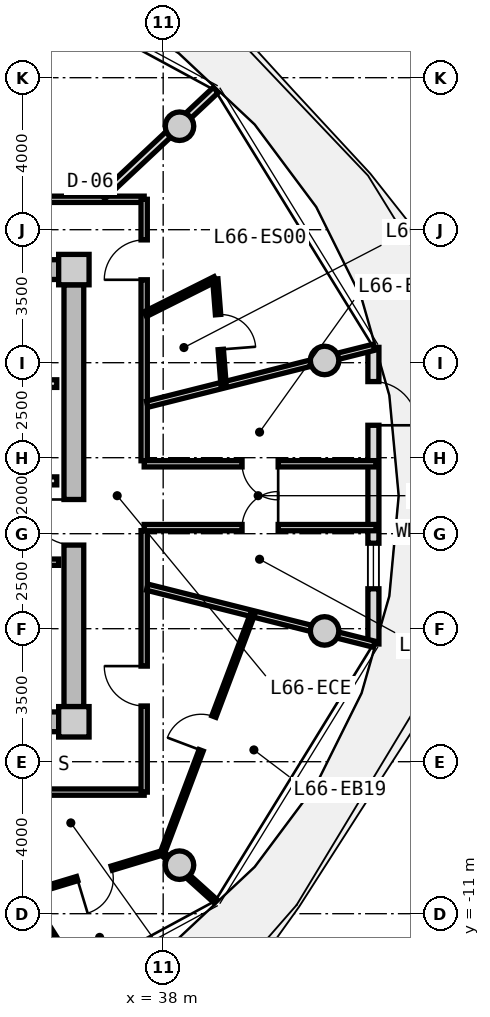
"""IFC4 building model, lengths in metres.
Left out: names, types, materials, properties, quantities, classifications, styles, units other than length and angle.
Written with IfcOpenShell. Run it as: python <this file> out.ifc"""

import sys

from ifc_helpers import new_model, si_unit, direction, frame, frame_2d, origin, origin_2d, place, context, subcontext, project, spatial, rectangle, circle, extrude, source, transform, mapped, element, fill, save


model = new_model("IFC4")
c1 = context("Model", 3, precision=1e-05, world=origin(), true_north=direction((0.0, 1.0)))
c2 = subcontext(c1, "Body", "Model", "MODEL_VIEW")
j1 = project(units=[si_unit("LENGTHUNIT", "METRE"), si_unit("PLANEANGLEUNIT", "RADIAN")], contexts=[c1])
p1 = place(None, origin())
s1 = spatial("IfcSite", under=j1, at=p1, CompositionType="ELEMENT")
p2 = place(p1, origin())
s2 = spatial("IfcBuilding", under=s1, at=p2, CompositionType="ELEMENT")
p3 = place(p2, frame((0.0, 0.0, 213.9)))
s3 = spatial("IfcBuildingStorey", under=s2, at=p3, CompositionType="ELEMENT", Elevation=213.9)
m1 = source(origin(), c2, "Body", "SweptSolid", [
    extrude(rectangle(XDim=0.8, YDim=0.8, at=origin_2d()), origin(), (0.0, 0.0, 1.0), 3.05),
])
for number, where, z_axis, x_axis in (
    (1, (35.65, -5.95, 0.0), (0.0, 0.0, 1.0), (1.0, 0.0, 0.0)),
    (2, (35.65, 5.95, 0.0), (0.0, 0.0, 1.0), (1.0, 0.0, 0.0)),
):
    element("IfcColumn", number, at=place(p3, frame(where, z_axis=z_axis, x_axis=x_axis)), inside=s3, PredefinedType="COLUMN", context=c2, shape_type="MappedRepresentation", body=[
        mapped(m1, transform((0.0, 0.0, 0.0), x_axis=(1.0, 0.0, 0.0), y_axis=(0.0, 1.0, 0.0), z_axis=(0.0, 0.0, 1.0), scale=1.0)),
    ])
m2 = source(origin(), c2, "Body", "SweptSolid", [
    extrude(rectangle(XDim=14.5, YDim=0.52, at=frame_2d((7.25, 0.0))), origin(), (0.0, 0.0, 1.0), 2.76),
])
for number, where, z_axis, x_axis in (
    (3, (20.75, 5.95, 0.0), (0.0, 0.0, 1.0), (1.0, 0.0, 0.0)),
    (4, (35.25, -5.95, 0.0), (0.0, 0.0, 1.0), (-1.0, 0.0, 0.0)),
):
    element("IfcWall", number, at=place(p3, frame(where, z_axis=z_axis, x_axis=x_axis)), inside=s3, PredefinedType="SHEAR", context=c2, shape_type="MappedRepresentation", body=[
        mapped(m2, transform((0.0, 0.0, 0.0), x_axis=(1.0, 0.0, 0.0), y_axis=(0.0, 1.0, 0.0), z_axis=(0.0, 0.0, 1.0), scale=1.0)),
    ])
m3 = source(origin(), c2, "Body", "SweptSolid", [
    extrude(rectangle(XDim=11.1, YDim=0.52, at=frame_2d((5.55, 0.0))), origin(), (0.0, 0.0, 1.0), 2.76),
])
p4 = place(p3, frame((35.65, 5.55, 0.0), z_axis=(0.0, 0.0, 1.0), x_axis=(0.0, -1.0, 0.0)))
e5 = element("IfcWall", 5, at=p4, inside=s3, PredefinedType="SHEAR", context=c2, shape_type="MappedRepresentation", body=[
    mapped(m3, transform((0.0, 0.0, 0.0), x_axis=(1.0, 0.0, 0.0), y_axis=(0.0, 1.0, 0.0), z_axis=(0.0, 0.0, 1.0), scale=1.0)),
])
p5 = place(p4, frame((5.65, 0.0, 0.0)))
e6 = element("IfcOpeningElement", 6, at=p5, cuts=e5, PredefinedType="OPENING", context=c2, shape_type="SweptSolid", body=[
    extrude(rectangle(XDim=1.2, YDim=2.15, at=frame_2d((0.6, 1.075))), frame((0.0, 0.27, 0.0), z_axis=(0.0, -1.0, 0.0), x_axis=(1.0, 0.0, 0.0)), (0.0, 0.0, 1.0), 0.54),
])
m4 = source(origin(), c2, "Body", "SweptSolid", [
    extrude(circle(Radius=0.375, at=origin_2d()), origin(), (0.0, 0.0, 1.0), 3.05),
])
for number, where, z_axis, x_axis in (
    (7, (42.247, 3.559, 0.0), (0.0, 0.0, 1.0), (1.0, 0.0, 0.0)),
    (8, (38.43, 9.723, 0.0), (0.0, 0.0, 1.0), (1.0, 0.0, 0.0)),
    (9, (38.43, -9.723, 0.0), (0.0, 0.0, 1.0), (1.0, 0.0, 0.0)),
    (10, (42.247, -3.559, 0.0), (0.0, 0.0, 1.0), (1.0, 0.0, 0.0)),
):
    element("IfcColumn", number, at=place(p3, frame(where, z_axis=z_axis, x_axis=x_axis)), inside=s3, PredefinedType="COLUMN", context=c2, shape_type="MappedRepresentation", body=[
        mapped(m4, transform((0.0, 0.0, 0.0), x_axis=(1.0, 0.0, 0.0), y_axis=(0.0, 1.0, 0.0), z_axis=(0.0, 0.0, 1.0), scale=1.0)),
    ])
m5 = source(origin(), c2, "Body", "SweptSolid", [
    extrude(rectangle(XDim=7.806, YDim=0.29, at=frame_2d((3.903, 0.0))), origin(), (0.0, 0.0, 1.0), 2.76),
])
p6 = place(p3, frame((43.532, 3.903, 0.0), z_axis=(0.0, 0.0, 1.0), x_axis=(0.0, -1.0, 0.0)))
e11 = element("IfcWall", 11, at=p6, inside=s3, PredefinedType="SOLIDWALL", context=c2, shape_type="MappedRepresentation", body=[
    mapped(m5, transform((0.0, 0.0, 0.0), x_axis=(1.0, 0.0, 0.0), y_axis=(0.0, 1.0, 0.0), z_axis=(0.0, 0.0, 1.0), scale=1.0)),
])
p7 = place(p6, frame((0.9, 0.0, 0.0)))
e12 = element("IfcOpeningElement", 12, at=p7, cuts=e11, PredefinedType="OPENING", context=c2, shape_type="SweptSolid", body=[
    extrude(rectangle(XDim=1.15, YDim=2.25, at=frame_2d((0.575, 1.125))), frame((0.0, 0.155, 0.0), z_axis=(0.0, -1.0, 0.0), x_axis=(1.0, 0.0, 0.0)), (0.0, 0.0, 1.0), 0.31),
])
p8 = place(p6, frame((5.153, 0.0, 0.85)))
e13 = element("IfcOpeningElement", 13, at=p8, cuts=e11, PredefinedType="OPENING", context=c2, shape_type="SweptSolid", body=[
    extrude(rectangle(XDim=1.2, YDim=1.5, at=frame_2d((0.6, 0.75))), frame((0.0, 0.155, 0.0), z_axis=(0.0, -1.0, 0.0), x_axis=(1.0, 0.0, 0.0)), (0.0, 0.0, 1.0), 0.31),
])
m6 = source(origin(), c2, "Body", "SweptSolid", [
    extrude(rectangle(XDim=3.2, YDim=0.2, at=frame_2d((1.6, 0.0))), origin(), (0.0, 0.0, 1.0), 2.745),
])
p9 = place(p3, frame((32.0, 2.95, 0.0), z_axis=(0.0, 0.0, 1.0), x_axis=(1.0, 0.0, 0.0)))
e14 = element("IfcWall", 14, at=p9, inside=s3, PredefinedType="PARTITIONING", context=c2, shape_type="MappedRepresentation", body=[
    mapped(m6, transform((0.0, 0.0, 0.0), x_axis=(1.0, 0.0, 0.0), y_axis=(0.0, 1.0, 0.0), z_axis=(0.0, 0.0, 1.0), scale=1.0)),
])
m7 = source(origin(), c2, "Body", "SweptSolid", [
    extrude(rectangle(XDim=6.66, YDim=0.21, at=frame_2d((3.33, 0.0))), origin(), (0.0, 0.0, 1.0), 2.745),
])
p10 = place(p3, frame((28.54, 0.39, 0.0), z_axis=(0.0, 0.0, 1.0), x_axis=(1.0, 0.0, 0.0)))
e15 = element("IfcWall", 15, at=p10, inside=s3, PredefinedType="PARTITIONING", context=c2, shape_type="MappedRepresentation", body=[
    mapped(m7, transform((0.0, 0.0, 0.0), x_axis=(1.0, 0.0, 0.0), y_axis=(0.0, 1.0, 0.0), z_axis=(0.0, 0.0, 1.0), scale=1.0)),
])
p11 = place(p10, frame((1.0, 0.0, 0.0)))
e16 = element("IfcOpeningElement", 16, at=p11, cuts=e15, PredefinedType="OPENING", context=c2, shape_type="SweptSolid", body=[
    extrude(rectangle(XDim=1.2, YDim=2.15, at=frame_2d((0.6, 1.075))), frame((0.0, 0.115, 0.0), z_axis=(0.0, -1.0, 0.0), x_axis=(1.0, 0.0, 0.0)), (0.0, 0.0, 1.0), 0.23),
])
m8 = source(origin(), c2, "Body", "SweptSolid", [
    extrude(rectangle(XDim=2.7, YDim=0.165, at=frame_2d((1.35, 0.0))), origin(), (0.0, 0.0, 1.0), 2.745),
])
p12 = place(p3, frame((32.55, -1.75, 0.0), z_axis=(0.0, 0.0, 1.0), x_axis=(1.0, 0.0, 0.0)))
e17 = element("IfcWall", 17, at=p12, inside=s3, PredefinedType="PARTITIONING", context=c2, shape_type="MappedRepresentation", body=[
    mapped(m8, transform((0.0, 0.0, 0.0), x_axis=(1.0, 0.0, 0.0), y_axis=(0.0, 1.0, 0.0), z_axis=(0.0, 0.0, 1.0), scale=1.0)),
])
p13 = place(p12, frame((0.85, 0.0, 0.0)))
e18 = element("IfcOpeningElement", 18, at=p13, cuts=e17, PredefinedType="OPENING", context=c2, shape_type="SweptSolid", body=[
    extrude(rectangle(XDim=0.925, YDim=2.1, at=frame_2d((0.462, 1.05))), frame((0.0, 0.093, 0.0), z_axis=(0.0, -1.0, 0.0), x_axis=(1.0, 0.0, 0.0)), (0.0, 0.0, 1.0), 0.185),
])
m9 = source(origin(), c2, "Body", "SweptSolid", [
    extrude(rectangle(XDim=8.58, YDim=0.165, at=frame_2d((4.29, 0.0))), origin(), (0.0, 0.0, 1.0), 2.745),
])
p14 = place(p3, frame((28.92, 7.8, 0.0), z_axis=(0.0, 0.0, 1.0), x_axis=(1.0, 0.0, 0.0)))
e19 = element("IfcWall", 19, at=p14, inside=s3, PredefinedType="PARTITIONING", context=c2, shape_type="MappedRepresentation", body=[
    mapped(m9, transform((0.0, 0.0, 0.0), x_axis=(1.0, 0.0, 0.0), y_axis=(0.0, 1.0, 0.0), z_axis=(0.0, 0.0, 1.0), scale=1.0)),
])
p15 = place(p14, frame((3.802, 0.0, 0.0)))
e20 = element("IfcOpeningElement", 20, at=p15, cuts=e19, PredefinedType="OPENING", context=c2, shape_type="SweptSolid", body=[
    extrude(rectangle(XDim=1.25, YDim=2.2, at=frame_2d((0.625, 1.1))), frame((0.0, 0.093, 0.0), z_axis=(0.0, -1.0, 0.0), x_axis=(1.0, 0.0, 0.0)), (0.0, 0.0, 1.0), 0.185),
])
m10 = source(origin(), c2, "Body", "SweptSolid", [
    extrude(rectangle(XDim=19.0, YDim=0.165, at=frame_2d((9.5, 0.0))), origin(), (0.0, 0.0, 1.0), 2.745),
])
p16 = place(p3, frame((37.5, -7.8, 0.0), z_axis=(0.0, 0.0, 1.0), x_axis=(-1.0, 0.0, 0.0)))
e21 = element("IfcWall", 21, at=p16, inside=s3, PredefinedType="PARTITIONING", context=c2, shape_type="MappedRepresentation", body=[
    mapped(m10, transform((0.0, 0.0, 0.0), x_axis=(1.0, 0.0, 0.0), y_axis=(0.0, 1.0, 0.0), z_axis=(0.0, 0.0, 1.0), scale=1.0)),
])
p17 = place(p16, frame((12.473, 0.0, 0.0)))
e22 = element("IfcOpeningElement", 22, at=p17, cuts=e21, PredefinedType="OPENING", context=c2, shape_type="SweptSolid", body=[
    extrude(rectangle(XDim=1.05, YDim=2.15, at=frame_2d((0.525, 1.075))), frame((0.0, 0.093, 0.0), z_axis=(0.0, -1.0, 0.0), x_axis=(1.0, 0.0, 0.0)), (0.0, 0.0, 1.0), 0.185),
])
m11 = source(origin(), c2, "Body", "SweptSolid", [
    extrude(rectangle(XDim=6.88, YDim=0.165, at=frame_2d((3.44, 0.0))), origin(), (0.0, 0.0, 1.0), 2.745),
])
p18 = place(p3, frame((37.5, 7.8, 0.0), z_axis=(0.0, 0.0, 1.0), x_axis=(0.0, -1.0, 0.0)))
e23 = element("IfcWall", 23, at=p18, inside=s3, PredefinedType="PARTITIONING", context=c2, shape_type="MappedRepresentation", body=[
    mapped(m11, transform((0.0, 0.0, 0.0), x_axis=(1.0, 0.0, 0.0), y_axis=(0.0, 1.0, 0.0), z_axis=(0.0, 0.0, 1.0), scale=1.0)),
])
p19 = place(p18, frame((1.068, 0.0, 0.0)))
e24 = element("IfcOpeningElement", 24, at=p19, cuts=e23, PredefinedType="OPENING", context=c2, shape_type="SweptSolid", body=[
    extrude(rectangle(XDim=1.05, YDim=2.15, at=frame_2d((0.525, 1.075))), frame((0.0, 0.093, 0.0), z_axis=(0.0, -1.0, 0.0), x_axis=(1.0, 0.0, 0.0)), (0.0, 0.0, 1.0), 0.185),
])
p20 = place(p3, frame((37.5, -0.92, 0.0), z_axis=(0.0, 0.0, 1.0), x_axis=(0.0, -1.0, 0.0)))
e25 = element("IfcWall", 25, at=p20, inside=s3, PredefinedType="PARTITIONING", context=c2, shape_type="MappedRepresentation", body=[
    mapped(m11, transform((0.0, 0.0, 0.0), x_axis=(1.0, 0.0, 0.0), y_axis=(0.0, 1.0, 0.0), z_axis=(0.0, 0.0, 1.0), scale=1.0)),
])
p21 = place(p20, frame((3.564, 0.0, 0.0)))
e26 = element("IfcOpeningElement", 26, at=p21, cuts=e25, PredefinedType="OPENING", context=c2, shape_type="SweptSolid", body=[
    extrude(rectangle(XDim=1.05, YDim=2.15, at=frame_2d((0.525, 1.075))), frame((0.0, 0.093, 0.0), z_axis=(0.0, -1.0, 0.0), x_axis=(1.0, 0.0, 0.0)), (0.0, 0.0, 1.0), 0.185),
])
m12 = source(origin(), c2, "Body", "SweptSolid", [
    extrude(rectangle(XDim=6.157, YDim=0.165, at=frame_2d((3.079, 0.0))), origin(), (0.0, 0.0, 1.0), 2.345),
])
for number, where, z_axis, x_axis in (
    (27, (37.58, -2.407, 0.0), (0.0, 0.0, 1.0), (0.97, -0.244, 0.0)),
    (28, (37.58, 2.407, 0.0), (0.0, 0.0, 1.0), (0.97, 0.244, 0.0)),
):
    element("IfcWall", number, at=place(p3, frame(where, z_axis=z_axis, x_axis=x_axis)), inside=s3, PredefinedType="PARTITIONING", context=c2, shape_type="MappedRepresentation", body=[
        mapped(m12, transform((0.0, 0.0, 0.0), x_axis=(1.0, 0.0, 0.0), y_axis=(0.0, 1.0, 0.0), z_axis=(0.0, 0.0, 1.0), scale=1.0)),
    ])
m13 = source(origin(), c2, "Body", "SweptSolid", [
    extrude(rectangle(XDim=6.101, YDim=0.165, at=frame_2d((3.051, 0.0))), origin(), (0.0, 0.0, 1.0), 2.745),
])
p22 = place(p3, frame((37.5, 0.84, 0.0), z_axis=(0.0, 0.0, 1.0), x_axis=(1.0, 0.0, 0.0)))
e29 = element("IfcWall", 29, at=p22, inside=s3, PredefinedType="PARTITIONING", context=c2, shape_type="MappedRepresentation", body=[
    mapped(m13, transform((0.0, 0.0, 0.0), x_axis=(1.0, 0.0, 0.0), y_axis=(0.0, 1.0, 0.0), z_axis=(0.0, 0.0, 1.0), scale=1.0)),
])
p23 = place(p22, frame((2.576, 0.0, 0.0)))
e30 = element("IfcOpeningElement", 30, at=p23, cuts=e29, PredefinedType="OPENING", context=c2, shape_type="SweptSolid", body=[
    extrude(rectangle(XDim=0.95, YDim=2.1, at=frame_2d((0.475, 1.05))), frame((0.0, 0.093, 0.0), z_axis=(0.0, -1.0, 0.0), x_axis=(1.0, 0.0, 0.0)), (0.0, 0.0, 1.0), 0.185),
])
p24 = place(p3, frame((43.601, -0.84, 0.0), z_axis=(0.0, 0.0, 1.0), x_axis=(-1.0, 0.0, 0.0)))
e31 = element("IfcWall", 31, at=p24, inside=s3, PredefinedType="PARTITIONING", context=c2, shape_type="MappedRepresentation", body=[
    mapped(m13, transform((0.0, 0.0, 0.0), x_axis=(1.0, 0.0, 0.0), y_axis=(0.0, 1.0, 0.0), z_axis=(0.0, 0.0, 1.0), scale=1.0)),
])
p25 = place(p24, frame((2.576, 0.0, 0.0)))
e32 = element("IfcOpeningElement", 32, at=p25, cuts=e31, PredefinedType="OPENING", context=c2, shape_type="SweptSolid", body=[
    extrude(rectangle(XDim=0.95, YDim=2.1, at=frame_2d((0.475, 1.05))), frame((0.0, 0.093, 0.0), z_axis=(0.0, -1.0, 0.0), x_axis=(1.0, 0.0, 0.0)), (0.0, 0.0, 1.0), 0.185),
])
m14 = source(origin(), c2, "Body", "SweptSolid", [
    extrude(rectangle(XDim=4.089, YDim=0.19, at=frame_2d((2.044, 0.0))), origin(), (0.0, 0.0, 1.0), 2.345),
])
p26 = place(p3, frame((36.402, 7.88, 0.0), z_axis=(0.0, 0.0, 1.0), x_axis=(0.729401273609, 0.684086092577, 0.0)))
e33 = element("IfcWall", 33, at=p26, inside=s3, PredefinedType="PARTITIONING", context=c2, shape_type="MappedRepresentation", body=[
    mapped(m14, transform((0.0, 0.0, 0.0), x_axis=(1.0, 0.0, 0.0), y_axis=(0.0, 1.0, 0.0), z_axis=(0.0, 0.0, 1.0), scale=1.0)),
])
m15 = source(origin(), c2, "Body", "SweptSolid", [
    extrude(rectangle(XDim=2.06, YDim=0.14, at=frame_2d((1.03, 0.0))), origin(), (0.0, 0.0, 1.0), 2.745),
])
p27 = place(p3, frame((37.53, 4.778, 0.0), z_axis=(0.0, 0.0, 1.0), x_axis=(0.893952568722, 0.448161583444, 0.0)))
e34 = element("IfcWall", 34, at=p27, inside=s3, PredefinedType="PARTITIONING", context=c2, shape_type="MappedRepresentation", body=[
    mapped(m15, transform((0.0, 0.0, 0.0), x_axis=(1.0, 0.0, 0.0), y_axis=(0.0, 1.0, 0.0), z_axis=(0.0, 0.0, 1.0), scale=1.0)),
])
m16 = source(origin(), c2, "Body", "SweptSolid", [
    extrude(rectangle(XDim=2.798, YDim=0.14, at=frame_2d((1.399, 0.0))), origin(), (0.0, 0.0, 1.0), 2.745),
])
p28 = place(p3, frame((39.371, 5.701, 0.0), z_axis=(0.0, 0.0, 1.0), x_axis=(0.077823984089, -0.996967114553, 0.0)))
e35 = element("IfcWall", 35, at=p28, inside=s3, PredefinedType="PARTITIONING", context=c2, shape_type="MappedRepresentation", body=[
    mapped(m16, transform((0.0, 0.0, 0.0), x_axis=(1.0, 0.0, 0.0), y_axis=(0.0, 1.0, 0.0), z_axis=(0.0, 0.0, 1.0), scale=1.0)),
])
p29 = place(p28, frame((0.939, 0.0, 0.0)))
e36 = element("IfcOpeningElement", 36, at=p29, cuts=e35, PredefinedType="OPENING", context=c2, shape_type="SweptSolid", body=[
    extrude(rectangle(XDim=0.92, YDim=2.1, at=frame_2d((0.46, 1.05))), frame((0.0, 0.08, 0.0), z_axis=(0.0, -1.0, 0.0), x_axis=(1.0, 0.0, 0.0)), (0.0, 0.0, 1.0), 0.16),
])
m17 = source(origin(), c2, "Body", "SweptSolid", [
    extrude(rectangle(XDim=6.738, YDim=0.115, at=frame_2d((3.369, 0.0))), origin(), (0.0, 0.0, 1.0), 2.745),
])
p30 = place(p3, frame((37.978, -9.409, 0.0), z_axis=(0.0, 0.0, 1.0), x_axis=(0.352945344347, 0.935643940772, 0.0)))
e37 = element("IfcWall", 37, at=p30, inside=s3, PredefinedType="PARTITIONING", context=c2, shape_type="MappedRepresentation", body=[
    mapped(m17, transform((0.0, 0.0, 0.0), x_axis=(1.0, 0.0, 0.0), y_axis=(0.0, 1.0, 0.0), z_axis=(0.0, 0.0, 1.0), scale=1.0)),
])
p31 = place(p30, frame((2.894, 0.0, 0.0)))
e38 = element("IfcOpeningElement", 38, at=p31, cuts=e37, PredefinedType="OPENING", context=c2, shape_type="SweptSolid", body=[
    extrude(rectangle(XDim=0.95, YDim=2.1, at=frame_2d((0.475, 1.05))), frame((0.0, 0.067, 0.0), z_axis=(0.0, -1.0, 0.0), x_axis=(1.0, 0.0, 0.0)), (0.0, 0.0, 1.0), 0.135),
])
m18 = source(origin(), c2, "Body", "SweptSolid", [
    extrude(rectangle(XDim=1.894, YDim=0.115, at=frame_2d((0.947, 0.0))), origin(), (0.0, 0.0, 1.0), 2.345),
])
p32 = place(p3, frame((37.978, -9.409, 0.0), z_axis=(0.0, 0.0, 1.0), x_axis=(0.742704207382, -0.669619638554, 0.0)))
e39 = element("IfcWall", 39, at=p32, inside=s3, PredefinedType="PARTITIONING", context=c2, shape_type="MappedRepresentation", body=[
    mapped(m18, transform((0.0, 0.0, 0.0), x_axis=(1.0, 0.0, 0.0), y_axis=(0.0, 1.0, 0.0), z_axis=(0.0, 0.0, 1.0), scale=1.0)),
])
m19 = source(origin(), c2, "Body", "SweptSolid", [
    extrude(rectangle(XDim=2.549, YDim=0.115, at=frame_2d((1.274, 0.0))), origin(), (0.0, 0.0, 1.0), 2.745),
])
p33 = place(p3, frame((34.414, -10.477, 0.0), z_axis=(0.0, 0.0, 1.0), x_axis=(0.534108310175, -0.845416059111, 0.0)))
e40 = element("IfcWall", 40, at=p33, inside=s3, PredefinedType="PARTITIONING", context=c2, shape_type="MappedRepresentation", body=[
    mapped(m19, transform((0.0, 0.0, 0.0), x_axis=(1.0, 0.0, 0.0), y_axis=(0.0, 1.0, 0.0), z_axis=(0.0, 0.0, 1.0), scale=1.0)),
])
m20 = source(origin(), c2, "Body", "SweptSolid", [
    extrude(rectangle(XDim=3.714, YDim=0.115, at=frame_2d((1.857, 0.0))), origin(), (0.0, 0.0, 1.0), 2.745),
])
p34 = place(p3, frame((34.414, -10.477, 0.0), z_axis=(0.0, 0.0, 1.0), x_axis=(0.957188983281, 0.28946372879, 0.0)))
e41 = element("IfcWall", 41, at=p34, inside=s3, PredefinedType="PARTITIONING", context=c2, shape_type="MappedRepresentation", body=[
    mapped(m20, transform((0.0, 0.0, 0.0), x_axis=(1.0, 0.0, 0.0), y_axis=(0.0, 1.0, 0.0), z_axis=(0.0, 0.0, 1.0), scale=1.0)),
])
p35 = place(p34, frame((1.382, 0.0, 0.0)))
e42 = element("IfcOpeningElement", 42, at=p35, cuts=e41, PredefinedType="OPENING", context=c2, shape_type="SweptSolid", body=[
    extrude(rectangle(XDim=0.95, YDim=2.1, at=frame_2d((0.475, 1.05))), frame((0.0, 0.067, 0.0), z_axis=(0.0, -1.0, 0.0), x_axis=(1.0, 0.0, 0.0)), (0.0, 0.0, 1.0), 0.135),
])
m21 = source(origin(), c2, "Body", "SweptSolid", [
    extrude(rectangle(XDim=1.15, YDim=2.25, at=frame_2d((0.575, 1.125))), frame((0.0, 0.025, 0.0), z_axis=(0.0, -1.0, 0.0), x_axis=(1.0, 0.0, 0.0)), (0.0, 0.0, 1.0), 0.05),
])
p36 = place(p7, origin())
e43 = element("IfcDoor", 43, at=p36, inside=s3, OperationType="SINGLE_SWING_RIGHT", PredefinedType="DOOR", context=c2, shape_type="MappedRepresentation", body=[
    mapped(m21, transform((0.0, 0.0, 0.0), x_axis=(1.0, 0.0, 0.0), y_axis=(0.0, 1.0, 0.0), z_axis=(0.0, 0.0, 1.0), scale=1.0)),
])
fill(e12, e43)
m22 = source(origin(), c2, "Body", "SweptSolid", [
    extrude(rectangle(XDim=1.2, YDim=1.5, at=frame_2d((0.6, 0.75))), frame((0.0, 0.03, 0.0), z_axis=(0.0, -1.0, 0.0), x_axis=(1.0, 0.0, 0.0)), (0.0, 0.0, 1.0), 0.06),
])
p37 = place(p8, origin())
e44 = element("IfcWindow", 44, at=p37, inside=s3, PartitioningType="SINGLE_PANEL", PredefinedType="WINDOW", context=c2, shape_type="MappedRepresentation", body=[
    mapped(m22, transform((0.0, 0.0, 0.0), x_axis=(1.0, 0.0, 0.0), y_axis=(0.0, 1.0, 0.0), z_axis=(0.0, 0.0, 1.0), scale=1.0)),
])
fill(e13, e44)
m23 = source(origin(), c2, "Body", "SweptSolid", [
    extrude(rectangle(XDim=1.2, YDim=2.15, at=frame_2d((0.6, 1.075))), frame((0.0, 0.025, 0.0), z_axis=(0.0, -1.0, 0.0), x_axis=(1.0, 0.0, 0.0)), (0.0, 0.0, 1.0), 0.05),
])
p38 = place(p5, frame((1.2, 0.0, 0.0), z_axis=(0.0, 0.0, 1.0), x_axis=(-1.0, 0.0, 0.0)))
e45 = element("IfcDoor", 45, at=p38, inside=s3, OperationType="SINGLE_SWING_RIGHT", PredefinedType="DOOR", context=c2, shape_type="MappedRepresentation", body=[
    mapped(m23, transform((0.0, 0.0, 0.0), x_axis=(1.0, 0.0, 0.0), y_axis=(0.0, 1.0, 0.0), z_axis=(0.0, 0.0, 1.0), scale=1.0)),
])
fill(e6, e45)
m24 = source(origin(), c2, "Body", "SweptSolid", [
    extrude(rectangle(XDim=0.95, YDim=2.1, at=frame_2d((0.475, 1.05))), frame((0.0, 0.025, 0.0), z_axis=(0.0, -1.0, 0.0), x_axis=(1.0, 0.0, 0.0)), (0.0, 0.0, 1.0), 0.05),
])
p39 = place(p25, frame((0.95, 0.0, 0.0), z_axis=(0.0, 0.0, 1.0), x_axis=(-1.0, 0.0, 0.0)))
e46 = element("IfcDoor", 46, at=p39, inside=s3, OperationType="SINGLE_SWING_RIGHT", PredefinedType="DOOR", context=c2, shape_type="MappedRepresentation", body=[
    mapped(m24, transform((0.0, 0.0, 0.0), x_axis=(1.0, 0.0, 0.0), y_axis=(0.0, 1.0, 0.0), z_axis=(0.0, 0.0, 1.0), scale=1.0)),
])
fill(e32, e46)
p40 = place(p23, frame((0.95, 0.0, 0.0), z_axis=(0.0, 0.0, 1.0), x_axis=(-1.0, 0.0, 0.0)))
e47 = element("IfcDoor", 47, at=p40, inside=s3, OperationType="SINGLE_SWING_LEFT", PredefinedType="DOOR", context=c2, shape_type="MappedRepresentation", body=[
    mapped(m24, transform((0.0, 0.0, 0.0), x_axis=(1.0, 0.0, 0.0), y_axis=(0.0, 1.0, 0.0), z_axis=(0.0, 0.0, 1.0), scale=1.0)),
])
fill(e30, e47)
m25 = source(origin(), c2, "Body", "SweptSolid", [
    extrude(rectangle(XDim=1.05, YDim=2.15, at=frame_2d((0.525, 1.075))), frame((0.0, 0.025, 0.0), z_axis=(0.0, -1.0, 0.0), x_axis=(1.0, 0.0, 0.0)), (0.0, 0.0, 1.0), 0.05),
])
p41 = place(p19, frame((1.05, 0.0, 0.0), z_axis=(0.0, 0.0, 1.0), x_axis=(-1.0, 0.0, 0.0)))
e48 = element("IfcDoor", 48, at=p41, inside=s3, OperationType="SINGLE_SWING_LEFT", PredefinedType="DOOR", context=c2, shape_type="MappedRepresentation", body=[
    mapped(m25, transform((0.0, 0.0, 0.0), x_axis=(1.0, 0.0, 0.0), y_axis=(0.0, 1.0, 0.0), z_axis=(0.0, 0.0, 1.0), scale=1.0)),
])
fill(e24, e48)
m26 = source(origin(), c2, "Body", "SweptSolid", [
    extrude(rectangle(XDim=0.92, YDim=2.1, at=frame_2d((0.46, 1.05))), frame((0.0, 0.025, 0.0), z_axis=(0.0, -1.0, 0.0), x_axis=(1.0, 0.0, 0.0)), (0.0, 0.0, 1.0), 0.05),
])
p42 = place(p29, origin())
e49 = element("IfcDoor", 49, at=p42, inside=s3, OperationType="SINGLE_SWING_RIGHT", PredefinedType="DOOR", context=c2, shape_type="MappedRepresentation", body=[
    mapped(m26, transform((0.0, 0.0, 0.0), x_axis=(1.0, 0.0, 0.0), y_axis=(0.0, 1.0, 0.0), z_axis=(0.0, 0.0, 1.0), scale=1.0)),
])
fill(e36, e49)
p43 = place(p21, frame((1.05, 0.0, 0.0), z_axis=(0.0, 0.0, 1.0), x_axis=(-1.0, 0.0, 0.0)))
e50 = element("IfcDoor", 50, at=p43, inside=s3, OperationType="SINGLE_SWING_RIGHT", PredefinedType="DOOR", context=c2, shape_type="MappedRepresentation", body=[
    mapped(m25, transform((0.0, 0.0, 0.0), x_axis=(1.0, 0.0, 0.0), y_axis=(0.0, 1.0, 0.0), z_axis=(0.0, 0.0, 1.0), scale=1.0)),
])
fill(e26, e50)
p44 = place(p35, frame((0.95, 0.0, 0.0), z_axis=(0.0, 0.0, 1.0), x_axis=(-1.0, 0.0, 0.0)))
e51 = element("IfcDoor", 51, at=p44, inside=s3, OperationType="SINGLE_SWING_RIGHT", PredefinedType="DOOR", context=c2, shape_type="MappedRepresentation", body=[
    mapped(m24, transform((0.0, 0.0, 0.0), x_axis=(1.0, 0.0, 0.0), y_axis=(0.0, 1.0, 0.0), z_axis=(0.0, 0.0, 1.0), scale=1.0)),
])
fill(e42, e51)
p45 = place(p31, origin())
e52 = element("IfcDoor", 52, at=p45, inside=s3, OperationType="SINGLE_SWING_LEFT", PredefinedType="DOOR", context=c2, shape_type="MappedRepresentation", body=[
    mapped(m24, transform((0.0, 0.0, 0.0), x_axis=(1.0, 0.0, 0.0), y_axis=(0.0, 1.0, 0.0), z_axis=(0.0, 0.0, 1.0), scale=1.0)),
])
fill(e38, e52)
save(model, sys.argv[1])
